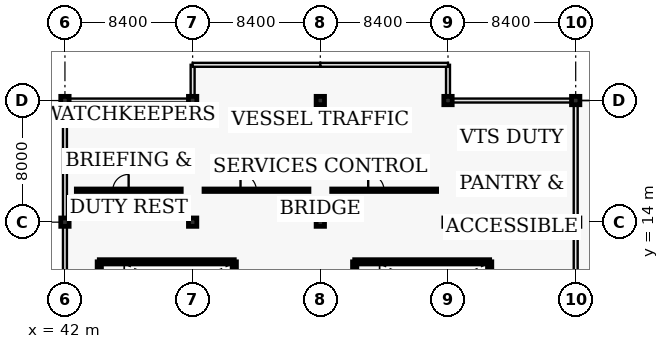
"""IFC4 building model, lengths in metres.
Left out: names, types, materials, properties, quantities, classifications, styles, units other than length and angle.
Written with IfcOpenShell. Run it as: python <this file> out.ifc"""

import sys

from ifc_helpers import new_model, si_unit, direction, frame, frame_2d, origin, origin_2d, place, context, subcontext, project, spatial, rectangle, extrude, element, fill, save


model = new_model("IFC4")
c1 = context("Model", 3, precision=1e-05, world=origin(), true_north=direction((0.0, 1.0)))
c2 = subcontext(c1, "Body", "Model", "MODEL_VIEW")
j1 = project(units=[si_unit("LENGTHUNIT", "METRE"), si_unit("PLANEANGLEUNIT", "RADIAN")], contexts=[c1])
p1 = place(None, origin())
s1 = spatial("IfcSite", under=j1, at=p1, CompositionType="ELEMENT")
p2 = place(p1, origin())
s2 = spatial("IfcBuilding", under=s1, at=p2, CompositionType="ELEMENT")
p3 = place(p2, frame((0.0, 0.0, 16.32)))
s3 = spatial("IfcBuildingStorey", under=s2, at=p3, CompositionType="ELEMENT", Elevation=16.32)
for number, where, z_axis, x_axis in (
    (1, (42.0, 14.0, 0.0), (0.0, 0.0, 1.0), (1.0, 0.0, 0.0)),
    (2, (42.0, 22.0, 0.0), (0.0, 0.0, 1.0), (1.0, 0.0, 0.0)),
    (3, (50.4, 14.0, 0.0), (0.0, 0.0, 1.0), (1.0, 0.0, 0.0)),
    (4, (50.4, 22.0, 0.0), (0.0, 0.0, 1.0), (1.0, 0.0, 0.0)),
    (5, (58.8, 14.0, 0.0), (0.0, 0.0, 1.0), (1.0, 0.0, 0.0)),
    (6, (58.8, 22.0, 0.0), (0.0, 0.0, 1.0), (1.0, 0.0, 0.0)),
    (7, (67.2, 14.0, 0.0), (0.0, 0.0, 1.0), (1.0, 0.0, 0.0)),
    (8, (67.2, 22.0, 0.0), (0.0, 0.0, 1.0), (1.0, 0.0, 0.0)),
    (9, (75.6, 14.0, 0.0), (0.0, 0.0, 1.0), (1.0, 0.0, 0.0)),
    (10, (75.6, 22.0, 0.0), (0.0, 0.0, 1.0), (1.0, 0.0, 0.0)),
):
    element("IfcColumn", number, at=place(p3, frame(where, z_axis=z_axis, x_axis=x_axis)), inside=s3, PredefinedType="COLUMN", context=c2, shape_type="SweptSolid", body=[
        extrude(rectangle(XDim=0.55, YDim=0.55, at=origin_2d()), origin(), (0.0, 0.0, 1.0), 3.2),
    ])
p4 = place(p3, frame((44.26, 11.39, 0.0), z_axis=(0.0, 0.0, 1.0), x_axis=(1.0, 0.0, 0.0)))
e11 = element("IfcWall", 11, at=p4, inside=s3, PredefinedType="SHEAR", context=c2, shape_type="SweptSolid", body=[
    extrude(rectangle(XDim=8.88, YDim=0.28, at=frame_2d((4.44, 0.0))), origin(), (0.0, 0.0, 1.0), 3.2),
])
p5 = place(p3, frame((44.26, 11.39, 0.0), z_axis=(0.0, 0.0, 1.0), x_axis=(0.0, -1.0, 0.0)))
e12 = element("IfcWall", 12, at=p5, inside=s3, PredefinedType="SHEAR", context=c2, shape_type="SweptSolid", body=[
    extrude(rectangle(XDim=3.43, YDim=0.28, at=frame_2d((1.715, 0.0))), origin(), (0.0, 0.0, 1.0), 3.2),
])
p6 = place(p5, frame((1.035, 0.0, 0.0)))
e13 = element("IfcOpeningElement", 13, at=p6, cuts=e12, PredefinedType="OPENING", context=c2, shape_type="SweptSolid", body=[
    extrude(rectangle(XDim=1.36, YDim=2.15, at=frame_2d((0.68, 1.075))), frame((0.0, 0.15, 0.0), z_axis=(0.0, -1.0, 0.0), x_axis=(1.0, 0.0, 0.0)), (0.0, 0.0, 1.0), 0.3),
])
p7 = place(p3, frame((53.14, 7.96, 0.0), z_axis=(0.0, 0.0, 1.0), x_axis=(0.0, 1.0, 0.0)))
e14 = element("IfcWall", 14, at=p7, inside=s3, PredefinedType="SHEAR", context=c2, shape_type="SweptSolid", body=[
    extrude(rectangle(XDim=3.43, YDim=0.28, at=frame_2d((1.715, 0.0))), origin(), (0.0, 0.0, 1.0), 3.2),
])
p8 = place(p3, frame((61.06, 11.39, 0.0), z_axis=(0.0, 0.0, 1.0), x_axis=(1.0, 0.0, 0.0)))
e15 = element("IfcWall", 15, at=p8, inside=s3, PredefinedType="SHEAR", context=c2, shape_type="SweptSolid", body=[
    extrude(rectangle(XDim=8.88, YDim=0.28, at=frame_2d((4.44, 0.0))), origin(), (0.0, 0.0, 1.0), 3.2),
])
p9 = place(p3, frame((61.06, 11.39, 0.0), z_axis=(0.0, 0.0, 1.0), x_axis=(0.0, -1.0, 0.0)))
e16 = element("IfcWall", 16, at=p9, inside=s3, PredefinedType="SHEAR", context=c2, shape_type="SweptSolid", body=[
    extrude(rectangle(XDim=3.43, YDim=0.28, at=frame_2d((1.715, 0.0))), origin(), (0.0, 0.0, 1.0), 3.2),
])
p10 = place(p9, frame((1.075, 0.0, 0.0)))
e17 = element("IfcOpeningElement", 17, at=p10, cuts=e16, PredefinedType="OPENING", context=c2, shape_type="SweptSolid", body=[
    extrude(rectangle(XDim=1.28, YDim=2.1, at=frame_2d((0.64, 1.05))), frame((0.0, 0.15, 0.0), z_axis=(0.0, -1.0, 0.0), x_axis=(1.0, 0.0, 0.0)), (0.0, 0.0, 1.0), 0.3),
])
p11 = place(p3, frame((69.94, 7.96, 0.0), z_axis=(0.0, 0.0, 1.0), x_axis=(0.0, 1.0, 0.0)))
e18 = element("IfcWall", 18, at=p11, inside=s3, PredefinedType="SHEAR", context=c2, shape_type="SweptSolid", body=[
    extrude(rectangle(XDim=3.43, YDim=0.28, at=frame_2d((1.715, 0.0))), origin(), (0.0, 0.0, 1.0), 3.2),
])
p12 = place(p3, frame((42.75, 16.1, 0.0), z_axis=(0.0, 0.0, 1.0), x_axis=(1.0, 0.0, 0.0)))
e19 = element("IfcWall", 19, at=p12, inside=s3, PredefinedType="PARTITIONING", context=c2, shape_type="SweptSolid", body=[
    extrude(rectangle(XDim=6.9, YDim=0.16, at=frame_2d((3.45, 0.0))), origin(), (0.0, 0.0, 1.0), 2.5),
])
p13 = place(p12, frame((2.4, 0.0, 0.0)))
e20 = element("IfcOpeningElement", 20, at=p13, cuts=e19, PredefinedType="OPENING", context=c2, shape_type="SweptSolid", body=[
    extrude(rectangle(XDim=1.04, YDim=2.14, at=frame_2d((0.52, 1.07))), frame((0.0, 0.09, 0.0), z_axis=(0.0, -1.0, 0.0), x_axis=(1.0, 0.0, 0.0)), (0.0, 0.0, 1.0), 0.18),
])
p14 = place(p3, frame((51.15, 16.1, 0.0), z_axis=(0.0, 0.0, 1.0), x_axis=(1.0, 0.0, 0.0)))
e21 = element("IfcWall", 21, at=p14, inside=s3, PredefinedType="PARTITIONING", context=c2, shape_type="SweptSolid", body=[
    extrude(rectangle(XDim=6.9, YDim=0.16, at=frame_2d((3.45, 0.0))), origin(), (0.0, 0.0, 1.0), 2.5),
])
p15 = place(p14, frame((2.4, 0.0, 0.0)))
e22 = element("IfcOpeningElement", 22, at=p15, cuts=e21, PredefinedType="OPENING", context=c2, shape_type="SweptSolid", body=[
    extrude(rectangle(XDim=1.04, YDim=2.14, at=frame_2d((0.52, 1.07))), frame((0.0, 0.09, 0.0), z_axis=(0.0, -1.0, 0.0), x_axis=(1.0, 0.0, 0.0)), (0.0, 0.0, 1.0), 0.18),
])
p16 = place(p3, frame((59.55, 16.1, 0.0), z_axis=(0.0, 0.0, 1.0), x_axis=(1.0, 0.0, 0.0)))
e23 = element("IfcWall", 23, at=p16, inside=s3, PredefinedType="PARTITIONING", context=c2, shape_type="SweptSolid", body=[
    extrude(rectangle(XDim=6.9, YDim=0.16, at=frame_2d((3.45, 0.0))), origin(), (0.0, 0.0, 1.0), 2.5),
])
p17 = place(p16, frame((2.4, 0.0, 0.0)))
e24 = element("IfcOpeningElement", 24, at=p17, cuts=e23, PredefinedType="OPENING", context=c2, shape_type="SweptSolid", body=[
    extrude(rectangle(XDim=1.04, YDim=2.14, at=frame_2d((0.52, 1.07))), frame((0.0, 0.09, 0.0), z_axis=(0.0, -1.0, 0.0), x_axis=(1.0, 0.0, 0.0)), (0.0, 0.0, 1.0), 0.18),
])
p18 = place(p3, frame((67.95, 16.1, 0.0), z_axis=(0.0, 0.0, 1.0), x_axis=(1.0, 0.0, 0.0)))
e25 = element("IfcWall", 25, at=p18, inside=s3, PredefinedType="PARTITIONING", context=c2, shape_type="SweptSolid", body=[
    extrude(rectangle(XDim=6.9, YDim=0.1, at=frame_2d((3.45, 0.0))), origin(), (0.0, 0.0, 1.0), 2.5),
])
p19 = place(p18, frame((2.4, 0.0, 0.0)))
e26 = element("IfcOpeningElement", 26, at=p19, cuts=e25, PredefinedType="OPENING", context=c2, shape_type="SweptSolid", body=[
    extrude(rectangle(XDim=1.06, YDim=2.1, at=frame_2d((0.53, 1.05))), frame((0.0, 0.06, 0.0), z_axis=(0.0, -1.0, 0.0), x_axis=(1.0, 0.0, 0.0)), (0.0, 0.0, 1.0), 0.12),
])
p20 = place(p13, origin())
e27 = element("IfcDoor", 27, at=p20, inside=s3, OperationType="SINGLE_SWING_RIGHT", PredefinedType="DOOR", context=c2, shape_type="SweptSolid", body=[
    extrude(rectangle(XDim=1.04, YDim=2.14, at=frame_2d((0.52, 1.07))), frame((0.0, 0.025, 0.0), z_axis=(0.0, -1.0, 0.0), x_axis=(1.0, 0.0, 0.0)), (0.0, 0.0, 1.0), 0.05),
])
fill(e20, e27)
p21 = place(p15, origin())
e28 = element("IfcDoor", 28, at=p21, inside=s3, OperationType="SINGLE_SWING_LEFT", PredefinedType="DOOR", context=c2, shape_type="SweptSolid", body=[
    extrude(rectangle(XDim=1.04, YDim=2.14, at=frame_2d((0.52, 1.07))), frame((0.0, 0.025, 0.0), z_axis=(0.0, -1.0, 0.0), x_axis=(1.0, 0.0, 0.0)), (0.0, 0.0, 1.0), 0.05),
])
fill(e22, e28)
p22 = place(p17, origin())
e29 = element("IfcDoor", 29, at=p22, inside=s3, OperationType="SINGLE_SWING_LEFT", PredefinedType="DOOR", context=c2, shape_type="SweptSolid", body=[
    extrude(rectangle(XDim=1.04, YDim=2.14, at=frame_2d((0.52, 1.07))), frame((0.0, 0.025, 0.0), z_axis=(0.0, -1.0, 0.0), x_axis=(1.0, 0.0, 0.0)), (0.0, 0.0, 1.0), 0.05),
])
fill(e24, e29)
p23 = place(p19, origin())
e30 = element("IfcDoor", 30, at=p23, inside=s3, OperationType="SINGLE_SWING_RIGHT", PredefinedType="DOOR", context=c2, shape_type="SweptSolid", body=[
    extrude(rectangle(XDim=1.06, YDim=2.1, at=frame_2d((0.53, 1.05))), frame((0.0, 0.025, 0.0), z_axis=(0.0, -1.0, 0.0), x_axis=(1.0, 0.0, 0.0)), (0.0, 0.0, 1.0), 0.05),
])
fill(e26, e30)
save(model, sys.argv[1])
